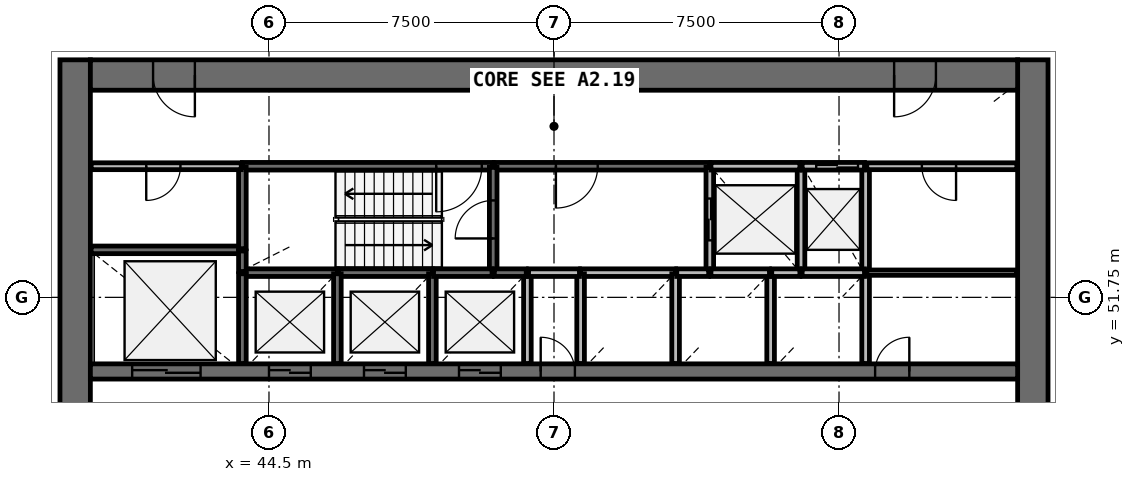
"""IFC4 building model, lengths in metres.
Left out: names, types, materials, properties, quantities, classifications, styles, units other than length and angle.
Written with IfcOpenShell. Run it as: python <this file> out.ifc"""

import sys

from ifc_helpers import new_model, si_unit, direction, frame, frame_2d, origin, place, context, subcontext, project, spatial, rectangle, extrude, source, transform, mapped, element, fill, save


model = new_model("IFC4")
c1 = context("Model", 3, precision=1e-05, world=origin(), true_north=direction((0.0, 1.0)))
c2 = subcontext(c1, "Body", "Model", "MODEL_VIEW")
j1 = project(units=[si_unit("LENGTHUNIT", "METRE"), si_unit("PLANEANGLEUNIT", "RADIAN")], contexts=[c1])
p1 = place(None, origin())
s1 = spatial("IfcSite", under=j1, at=p1, CompositionType="ELEMENT")
p2 = place(p1, origin())
s2 = spatial("IfcBuilding", under=s1, at=p2, CompositionType="ELEMENT")
p3 = place(p2, frame((0.0, 0.0, 79.8)))
s3 = spatial("IfcBuildingStorey", under=s2, at=p3, CompositionType="ELEMENT", Elevation=79.8)
p4 = place(p3, frame((64.6, 38.0, 0.0), z_axis=(0.0, 0.0, 1.0), x_axis=(0.0, 1.0, 0.0)))
e1 = element("IfcWall", 1, at=p4, inside=s3, PredefinedType="SHEAR", context=c2, shape_type="SweptSolid", body=[
    extrude(rectangle(XDim=20.0, YDim=0.8, at=frame_2d((10.0, 0.0))), origin(), (0.0, 0.0, 1.0), 4.1),
])
p5 = place(p4, frame((9.1, 0.0, 0.0)))
e2 = element("IfcOpeningElement", 2, at=p5, cuts=e1, PredefinedType="OPENING", context=c2, shape_type="SweptSolid", body=[
    extrude(rectangle(XDim=1.8, YDim=2.1, at=frame_2d((0.9, 1.05))), frame((0.0, 0.41, 0.0), z_axis=(0.0, -1.0, 0.0), x_axis=(1.0, 0.0, 0.0)), (0.0, 0.0, 1.0), 0.82),
])
p6 = place(p3, frame((39.4, 58.0, 0.0), z_axis=(0.0, 0.0, 1.0), x_axis=(0.0, -1.0, 0.0)))
e3 = element("IfcWall", 3, at=p6, inside=s3, PredefinedType="SHEAR", context=c2, shape_type="SweptSolid", body=[
    extrude(rectangle(XDim=20.0, YDim=0.8, at=frame_2d((10.0, 0.0))), origin(), (0.0, 0.0, 1.0), 4.1),
])
p7 = place(p6, frame((9.1, 0.0, 0.0)))
e4 = element("IfcOpeningElement", 4, at=p7, cuts=e3, PredefinedType="OPENING", context=c2, shape_type="SweptSolid", body=[
    extrude(rectangle(XDim=1.8, YDim=2.1, at=frame_2d((0.9, 1.05))), frame((0.0, 0.41, 0.0), z_axis=(0.0, -1.0, 0.0), x_axis=(1.0, 0.0, 0.0)), (0.0, 0.0, 1.0), 0.82),
])
p8 = place(p3, frame((64.2, 57.6, 0.0), z_axis=(0.0, 0.0, 1.0), x_axis=(-1.0, 0.0, 0.0)))
e5 = element("IfcWall", 5, at=p8, inside=s3, PredefinedType="SHEAR", context=c2, shape_type="SweptSolid", body=[
    extrude(rectangle(XDim=24.4, YDim=0.8, at=frame_2d((12.2, 0.0))), origin(), (0.0, 0.0, 1.0), 4.1),
])
p9 = place(p8, frame((21.65, 0.0, 0.0)))
e6 = element("IfcOpeningElement", 6, at=p9, cuts=e5, PredefinedType="OPENING", context=c2, shape_type="SweptSolid", body=[
    extrude(rectangle(XDim=1.1, YDim=2.1, at=frame_2d((0.55, 1.05))), frame((0.0, 0.41, 0.0), z_axis=(0.0, -1.0, 0.0), x_axis=(1.0, 0.0, 0.0)), (0.0, 0.0, 1.0), 0.82),
])
p10 = place(p8, frame((2.15, 0.0, 0.0)))
e7 = element("IfcOpeningElement", 7, at=p10, cuts=e5, PredefinedType="OPENING", context=c2, shape_type="SweptSolid", body=[
    extrude(rectangle(XDim=1.1, YDim=2.1, at=frame_2d((0.55, 1.05))), frame((0.0, 0.41, 0.0), z_axis=(0.0, -1.0, 0.0), x_axis=(1.0, 0.0, 0.0)), (0.0, 0.0, 1.0), 0.82),
])
p11 = place(p3, frame((39.8, 49.8, 0.0), z_axis=(0.0, 0.0, 1.0), x_axis=(1.0, 0.0, 0.0)))
e8 = element("IfcWall", 8, at=p11, inside=s3, PredefinedType="SHEAR", context=c2, shape_type="SweptSolid", body=[
    extrude(rectangle(XDim=24.4, YDim=0.4, at=frame_2d((12.2, 0.0))), origin(), (0.0, 0.0, 1.0), 4.1),
])
p12 = place(p11, frame((4.7, 0.0, 0.0)))
e9 = element("IfcOpeningElement", 9, at=p12, cuts=e8, PredefinedType="OPENING", context=c2, shape_type="SweptSolid", body=[
    extrude(rectangle(XDim=1.1, YDim=2.1, at=frame_2d((0.55, 1.05))), frame((0.0, 0.21, 0.0), z_axis=(0.0, -1.0, 0.0), x_axis=(1.0, 0.0, 0.0)), (0.0, 0.0, 1.0), 0.42),
])
p13 = place(p11, frame((7.2, 0.0, 0.0)))
e10 = element("IfcOpeningElement", 10, at=p13, cuts=e8, PredefinedType="OPENING", context=c2, shape_type="SweptSolid", body=[
    extrude(rectangle(XDim=1.1, YDim=2.1, at=frame_2d((0.55, 1.05))), frame((0.0, 0.21, 0.0), z_axis=(0.0, -1.0, 0.0), x_axis=(1.0, 0.0, 0.0)), (0.0, 0.0, 1.0), 0.42),
])
p14 = place(p11, frame((9.7, 0.0, 0.0)))
e11 = element("IfcOpeningElement", 11, at=p14, cuts=e8, PredefinedType="OPENING", context=c2, shape_type="SweptSolid", body=[
    extrude(rectangle(XDim=1.1, YDim=2.1, at=frame_2d((0.55, 1.05))), frame((0.0, 0.21, 0.0), z_axis=(0.0, -1.0, 0.0), x_axis=(1.0, 0.0, 0.0)), (0.0, 0.0, 1.0), 0.42),
])
p15 = place(p11, frame((1.1, 0.0, 0.0)))
e12 = element("IfcOpeningElement", 12, at=p15, cuts=e8, PredefinedType="OPENING", context=c2, shape_type="SweptSolid", body=[
    extrude(rectangle(XDim=1.8, YDim=2.4, at=frame_2d((0.9, 1.2))), frame((0.0, 0.21, 0.0), z_axis=(0.0, -1.0, 0.0), x_axis=(1.0, 0.0, 0.0)), (0.0, 0.0, 1.0), 0.42),
])
p16 = place(p11, frame((20.65, 0.0, 0.0)))
e13 = element("IfcOpeningElement", 13, at=p16, cuts=e8, PredefinedType="OPENING", context=c2, shape_type="SweptSolid", body=[
    extrude(rectangle(XDim=0.9, YDim=2.1, at=frame_2d((0.45, 1.05))), frame((0.0, 0.21, 0.0), z_axis=(0.0, -1.0, 0.0), x_axis=(1.0, 0.0, 0.0)), (0.0, 0.0, 1.0), 0.42),
])
p17 = place(p11, frame((11.85, 0.0, 0.0)))
e14 = element("IfcOpeningElement", 14, at=p17, cuts=e8, PredefinedType="OPENING", context=c2, shape_type="SweptSolid", body=[
    extrude(rectangle(XDim=0.9, YDim=2.1, at=frame_2d((0.45, 1.05))), frame((0.0, 0.21, 0.0), z_axis=(0.0, -1.0, 0.0), x_axis=(1.0, 0.0, 0.0)), (0.0, 0.0, 1.0), 0.42),
])
p18 = place(p3, frame((50.4, 55.2, 0.0), z_axis=(0.0, 0.0, 1.0), x_axis=(-1.0, 0.0, 0.0)))
e15 = element("IfcWall", 15, at=p18, inside=s3, PredefinedType="SOLIDWALL", context=c2, shape_type="SweptSolid", body=[
    extrude(rectangle(XDim=6.6, YDim=0.2, at=frame_2d((3.3, 0.0))), origin(), (0.0, 0.0, 1.0), 3.7),
])
p19 = place(p18, frame((0.3, 0.0, 0.0)))
e16 = element("IfcOpeningElement", 16, at=p19, cuts=e15, PredefinedType="OPENING", context=c2, shape_type="SweptSolid", body=[
    extrude(rectangle(XDim=1.2, YDim=2.1, at=frame_2d((0.6, 1.05))), frame((0.0, 0.11, 0.0), z_axis=(0.0, -1.0, 0.0), x_axis=(1.0, 0.0, 0.0)), (0.0, 0.0, 1.0), 0.22),
])
p20 = place(p3, frame((56.1, 55.2, 0.0), z_axis=(0.0, 0.0, 1.0), x_axis=(-1.0, 0.0, 0.0)))
e17 = element("IfcWall", 17, at=p20, inside=s3, PredefinedType="SOLIDWALL", context=c2, shape_type="SweptSolid", body=[
    extrude(rectangle(XDim=5.67, YDim=0.2, at=frame_2d((2.835, 0.0))), origin(), (0.0, 0.0, 1.0), 3.7),
])
p21 = place(p20, frame((2.95, 0.0, 0.0)))
e18 = element("IfcOpeningElement", 18, at=p21, cuts=e17, PredefinedType="OPENING", context=c2, shape_type="SweptSolid", body=[
    extrude(rectangle(XDim=1.1, YDim=2.1, at=frame_2d((0.55, 1.05))), frame((0.0, 0.11, 0.0), z_axis=(0.0, -1.0, 0.0), x_axis=(1.0, 0.0, 0.0)), (0.0, 0.0, 1.0), 0.22),
])
p22 = place(p3, frame((43.8, 53.0, 0.0), z_axis=(0.0, 0.0, 1.0), x_axis=(-1.0, 0.0, 0.0)))
e19 = element("IfcWall", 19, at=p22, inside=s3, PredefinedType="SOLIDWALL", context=c2, shape_type="SweptSolid", body=[
    extrude(rectangle(XDim=3.98, YDim=0.2, at=frame_2d((1.99, 0.0))), origin(), (0.0, 0.0, 1.0), 3.7),
])
p23 = place(p3, frame((50.4, 52.4, 0.0), z_axis=(0.0, 0.0, 1.0), x_axis=(0.0, 1.0, 0.0)))
e20 = element("IfcWall", 20, at=p23, inside=s3, PredefinedType="SOLIDWALL", context=c2, shape_type="SweptSolid", body=[
    extrude(rectangle(XDim=2.77, YDim=0.2, at=frame_2d((1.385, 0.0))), origin(), (0.0, 0.0, 1.0), 3.7),
])
p24 = place(p23, frame((0.9, 0.0, 0.0)))
e21 = element("IfcOpeningElement", 21, at=p24, cuts=e20, PredefinedType="OPENING", context=c2, shape_type="SweptSolid", body=[
    extrude(rectangle(XDim=1.0, YDim=2.1, at=frame_2d((0.5, 1.05))), frame((0.0, 0.11, 0.0), z_axis=(0.0, -1.0, 0.0), x_axis=(1.0, 0.0, 0.0)), (0.0, 0.0, 1.0), 0.22),
])
p25 = place(p3, frame((56.1, 55.17, 0.0), z_axis=(0.0, 0.0, 1.0), x_axis=(0.0, -1.0, 0.0)))
e22 = element("IfcWall", 22, at=p25, inside=s3, PredefinedType="SOLIDWALL", context=c2, shape_type="SweptSolid", body=[
    extrude(rectangle(XDim=2.77, YDim=0.2, at=frame_2d((1.385, 0.0))), origin(), (0.0, 0.0, 1.0), 3.7),
])
p26 = place(p25, frame((0.82, 0.0, 0.0)))
e23 = element("IfcOpeningElement", 23, at=p26, cuts=e22, PredefinedType="OPENING", context=c2, shape_type="SweptSolid", body=[
    extrude(rectangle(XDim=1.1, YDim=2.1, at=frame_2d((0.55, 1.05))), frame((0.0, 0.11, 0.0), z_axis=(0.0, -1.0, 0.0), x_axis=(1.0, 0.0, 0.0)), (0.0, 0.0, 1.0), 0.22),
])
for number, where, z_axis, x_axis in (
    (24, (58.5, 52.4, 0.0), (0.0, 0.0, 1.0), (0.0, 1.0, 0.0)),
    (25, (60.2, 52.4, 0.0), (0.0, 0.0, 1.0), (0.0, 1.0, 0.0)),
):
    element("IfcWall", number, at=place(p3, frame(where, z_axis=z_axis, x_axis=x_axis)), inside=s3, PredefinedType="SOLIDWALL", context=c2, shape_type="SweptSolid", body=[
        extrude(rectangle(XDim=2.8, YDim=0.2, at=frame_2d((1.4, 0.0))), origin(), (0.0, 0.0, 1.0), 3.7),
    ])
p27 = place(p3, frame((46.3, 52.4, 0.0), z_axis=(0.0, 0.0, 1.0), x_axis=(-1.0, 0.0, 0.0)))
e26 = element("IfcWall", 26, at=p27, inside=s3, PredefinedType="SOLIDWALL", context=c2, shape_type="SweptSolid", body=[
    extrude(rectangle(XDim=2.5, YDim=0.2, at=frame_2d((1.25, 0.0))), origin(), (0.0, 0.0, 1.0), 3.7),
])
p28 = place(p3, frame((48.8, 52.4, 0.0), z_axis=(0.0, 0.0, 1.0), x_axis=(-1.0, 0.0, 0.0)))
e27 = element("IfcWall", 27, at=p28, inside=s3, PredefinedType="SOLIDWALL", context=c2, shape_type="SweptSolid", body=[
    extrude(rectangle(XDim=2.47, YDim=0.2, at=frame_2d((1.235, 0.0))), origin(), (0.0, 0.0, 1.0), 3.7),
])
p29 = place(p3, frame((55.2, 52.4, 0.0), z_axis=(0.0, 0.0, 1.0), x_axis=(-1.0, 0.0, 0.0)))
e28 = element("IfcWall", 28, at=p29, inside=s3, PredefinedType="SOLIDWALL", context=c2, shape_type="SweptSolid", body=[
    extrude(rectangle(XDim=2.5, YDim=0.2, at=frame_2d((1.25, 0.0))), origin(), (0.0, 0.0, 1.0), 3.7),
])
p30 = place(p3, frame((58.47, 55.2, 0.0), z_axis=(0.0, 0.0, 1.0), x_axis=(-1.0, 0.0, 0.0)))
e29 = element("IfcWall", 29, at=p30, inside=s3, PredefinedType="SOLIDWALL", context=c2, shape_type="SweptSolid", body=[
    extrude(rectangle(XDim=2.34, YDim=0.2, at=frame_2d((1.17, 0.0))), origin(), (0.0, 0.0, 1.0), 3.7),
])
for number, where, z_axis, x_axis in (
    (30, (43.8, 52.37, 0.0), (0.0, 0.0, 1.0), (0.0, -1.0, 0.0)),
    (31, (46.3, 50.01, 0.0), (0.0, 0.0, 1.0), (0.0, 1.0, 0.0)),
    (32, (48.8, 50.01, 0.0), (0.0, 0.0, 1.0), (0.0, 1.0, 0.0)),
):
    element("IfcWall", number, at=place(p3, frame(where, z_axis=z_axis, x_axis=x_axis)), inside=s3, PredefinedType="SOLIDWALL", context=c2, shape_type="SweptSolid", body=[
        extrude(rectangle(XDim=2.36, YDim=0.2, at=frame_2d((1.18, 0.0))), origin(), (0.0, 0.0, 1.0), 3.7),
    ])
p31 = place(p3, frame((51.3, 50.01, 0.0), z_axis=(0.0, 0.0, 1.0), x_axis=(0.0, 1.0, 0.0)))
e33 = element("IfcWall", 33, at=p31, inside=s3, PredefinedType="SOLIDWALL", context=c2, shape_type="SweptSolid", body=[
    extrude(rectangle(XDim=2.39, YDim=0.2, at=frame_2d((1.195, 0.0))), origin(), (0.0, 0.0, 1.0), 3.7),
])
for number, where, z_axis, x_axis in (
    (34, (52.7, 52.37, 0.0), (0.0, 0.0, 1.0), (0.0, -1.0, 0.0)),
    (35, (55.2, 50.01, 0.0), (0.0, 0.0, 1.0), (0.0, 1.0, 0.0)),
):
    element("IfcWall", number, at=place(p3, frame(where, z_axis=z_axis, x_axis=x_axis)), inside=s3, PredefinedType="SOLIDWALL", context=c2, shape_type="SweptSolid", body=[
        extrude(rectangle(XDim=2.36, YDim=0.2, at=frame_2d((1.18, 0.0))), origin(), (0.0, 0.0, 1.0), 3.7),
    ])
p32 = place(p3, frame((57.7, 50.01, 0.0), z_axis=(0.0, 0.0, 1.0), x_axis=(0.0, 1.0, 0.0)))
e36 = element("IfcWall", 36, at=p32, inside=s3, PredefinedType="SOLIDWALL", context=c2, shape_type="SweptSolid", body=[
    extrude(rectangle(XDim=2.39, YDim=0.2, at=frame_2d((1.195, 0.0))), origin(), (0.0, 0.0, 1.0), 3.7),
])
p33 = place(p3, frame((60.2, 50.01, 0.0), z_axis=(0.0, 0.0, 1.0), x_axis=(0.0, 1.0, 0.0)))
e37 = element("IfcWall", 37, at=p33, inside=s3, PredefinedType="SOLIDWALL", context=c2, shape_type="SweptSolid", body=[
    extrude(rectangle(XDim=2.36, YDim=0.2, at=frame_2d((1.18, 0.0))), origin(), (0.0, 0.0, 1.0), 3.7),
])
p34 = place(p3, frame((43.8, 55.17, 0.0), z_axis=(0.0, 0.0, 1.0), x_axis=(0.0, -1.0, 0.0)))
e38 = element("IfcWall", 38, at=p34, inside=s3, PredefinedType="SOLIDWALL", context=c2, shape_type="SweptSolid", body=[
    extrude(rectangle(XDim=2.14, YDim=0.2, at=frame_2d((1.07, 0.0))), origin(), (0.0, 0.0, 1.0), 3.7),
])
p35 = place(p3, frame((60.17, 52.4, 0.0), z_axis=(0.0, 0.0, 1.0), x_axis=(-1.0, 0.0, 0.0)))
e39 = element("IfcWall", 39, at=p35, inside=s3, PredefinedType="SOLIDWALL", context=c2, shape_type="SweptSolid", body=[
    extrude(rectangle(XDim=1.64, YDim=0.2, at=frame_2d((0.82, 0.0))), origin(), (0.0, 0.0, 1.0), 3.7),
])
p36 = place(p3, frame((60.17, 55.2, 0.0), z_axis=(0.0, 0.0, 1.0), x_axis=(-1.0, 0.0, 0.0)))
e40 = element("IfcWall", 40, at=p36, inside=s3, PredefinedType="SOLIDWALL", context=c2, shape_type="SweptSolid", body=[
    extrude(rectangle(XDim=1.64, YDim=0.2, at=frame_2d((0.82, 0.0))), origin(), (0.0, 0.0, 1.0), 3.7),
])
p37 = place(p36, frame((0.17, 0.0, 0.0)))
e41 = element("IfcOpeningElement", 41, at=p37, cuts=e40, PredefinedType="OPENING", context=c2, shape_type="SweptSolid", body=[
    extrude(rectangle(XDim=1.1, YDim=2.1, at=frame_2d((0.55, 1.05))), frame((0.0, 0.11, 0.0), z_axis=(0.0, -1.0, 0.0), x_axis=(1.0, 0.0, 0.0)), (0.0, 0.0, 1.0), 0.22),
])
for number, where, z_axis, x_axis in (
    (42, (50.37, 52.4, 0.0), (0.0, 0.0, 1.0), (-1.0, 0.0, 0.0)),
    (43, (57.67, 52.4, 0.0), (0.0, 0.0, 1.0), (-1.0, 0.0, 0.0)),
):
    element("IfcWall", number, at=place(p3, frame(where, z_axis=z_axis, x_axis=x_axis)), inside=s3, PredefinedType="SOLIDWALL", context=c2, shape_type="SweptSolid", body=[
        extrude(rectangle(XDim=1.54, YDim=0.2, at=frame_2d((0.77, 0.0))), origin(), (0.0, 0.0, 1.0), 3.7),
    ])
p38 = place(p3, frame((51.33, 52.4, 0.0), z_axis=(0.0, 0.0, 1.0), x_axis=(1.0, 0.0, 0.0)))
e44 = element("IfcWall", 44, at=p38, inside=s3, PredefinedType="SOLIDWALL", context=c2, shape_type="SweptSolid", body=[
    extrude(rectangle(XDim=1.34, YDim=0.2, at=frame_2d((0.67, 0.0))), origin(), (0.0, 0.0, 1.0), 3.7),
])
for number, where, z_axis, x_axis in (
    (45, (51.27, 52.4, 0.0), (0.0, 0.0, 1.0), (-1.0, 0.0, 0.0)),
    (46, (56.07, 52.4, 0.0), (0.0, 0.0, 1.0), (-1.0, 0.0, 0.0)),
):
    element("IfcWall", number, at=place(p3, frame(where, z_axis=z_axis, x_axis=x_axis)), inside=s3, PredefinedType="SOLIDWALL", context=c2, shape_type="SweptSolid", body=[
        extrude(rectangle(XDim=0.84, YDim=0.2, at=frame_2d((0.42, 0.0))), origin(), (0.0, 0.0, 1.0), 3.7),
    ])
p39 = place(p3, frame((58.47, 52.4, 0.0), z_axis=(0.0, 0.0, 1.0), x_axis=(-1.0, 0.0, 0.0)))
e47 = element("IfcWall", 47, at=p39, inside=s3, PredefinedType="SOLIDWALL", context=c2, shape_type="SweptSolid", body=[
    extrude(rectangle(XDim=0.74, YDim=0.2, at=frame_2d((0.37, 0.0))), origin(), (0.0, 0.0, 1.0), 3.7),
])
p40 = place(p3, frame((43.8, 52.43, 0.0), z_axis=(0.0, 0.0, 1.0), x_axis=(0.0, 1.0, 0.0)))
e48 = element("IfcWall", 48, at=p40, inside=s3, PredefinedType="SOLIDWALL", context=c2, shape_type="SweptSolid", body=[
    extrude(rectangle(XDim=0.54, YDim=0.2, at=frame_2d((0.27, 0.0))), origin(), (0.0, 0.0, 1.0), 3.7),
])
p41 = place(p3, frame((64.18, 55.2, 0.0), z_axis=(0.0, 0.0, 1.0), x_axis=(-1.0, 0.0, 0.0)))
e49 = element("IfcWall", 49, at=p41, inside=s3, PredefinedType="PARTITIONING", context=c2, shape_type="SweptSolid", body=[
    extrude(rectangle(XDim=3.95, YDim=0.18, at=frame_2d((1.975, 0.0))), origin(), (0.0, 0.0, 1.0), 3.7),
])
p42 = place(p41, frame((1.6, 0.0, 0.0)))
e50 = element("IfcOpeningElement", 50, at=p42, cuts=e49, PredefinedType="OPENING", context=c2, shape_type="SweptSolid", body=[
    extrude(rectangle(XDim=0.9, YDim=2.1, at=frame_2d((0.45, 1.05))), frame((0.0, 0.1, 0.0), z_axis=(0.0, -1.0, 0.0), x_axis=(1.0, 0.0, 0.0)), (0.0, 0.0, 1.0), 0.2),
])
p43 = place(p3, frame((43.77, 55.2, 0.0), z_axis=(0.0, 0.0, 1.0), x_axis=(-1.0, 0.0, 0.0)))
e51 = element("IfcWall", 51, at=p43, inside=s3, PredefinedType="PARTITIONING", context=c2, shape_type="SweptSolid", body=[
    extrude(rectangle(XDim=3.95, YDim=0.18, at=frame_2d((1.975, 0.0))), origin(), (0.0, 0.0, 1.0), 3.7),
])
p44 = place(p43, frame((1.6, 0.0, 0.0)))
e52 = element("IfcOpeningElement", 52, at=p44, cuts=e51, PredefinedType="OPENING", context=c2, shape_type="SweptSolid", body=[
    extrude(rectangle(XDim=0.9, YDim=2.1, at=frame_2d((0.45, 1.05))), frame((0.0, 0.1, 0.0), z_axis=(0.0, -1.0, 0.0), x_axis=(1.0, 0.0, 0.0)), (0.0, 0.0, 1.0), 0.2),
])
p45 = place(p3, frame((64.18, 52.4, 0.0), z_axis=(0.0, 0.0, 1.0), x_axis=(-1.0, 0.0, 0.0)))
e53 = element("IfcWall", 53, at=p45, inside=s3, PredefinedType="PARTITIONING", context=c2, shape_type="SweptSolid", body=[
    extrude(rectangle(XDim=3.95, YDim=0.14, at=frame_2d((1.975, 0.0))), origin(), (0.0, 0.0, 1.0), 2.9),
])
m1 = source(origin(), c2, "Body", "SweptSolid", [
    extrude(rectangle(XDim=1.1, YDim=2.1, at=frame_2d((0.55, 1.05))), frame((0.0, 0.025, 0.0), z_axis=(0.0, -1.0, 0.0), x_axis=(1.0, 0.0, 0.0)), (0.0, 0.0, 1.0), 0.05),
])
p46 = place(p12, origin())
e54 = element("IfcDoor", 54, at=p46, inside=s3, OperationType="DOUBLE_DOOR_SLIDING", PredefinedType="USERDEFINED", context=c2, shape_type="MappedRepresentation", body=[
    mapped(m1, transform((0.0, 0.0, 0.0), scale=1.0)),
])
fill(e9, e54)
p47 = place(p13, origin())
e55 = element("IfcDoor", 55, at=p47, inside=s3, OperationType="DOUBLE_DOOR_SLIDING", PredefinedType="USERDEFINED", context=c2, shape_type="MappedRepresentation", body=[
    mapped(m1, transform((0.0, 0.0, 0.0), scale=1.0)),
])
fill(e10, e55)
p48 = place(p14, origin())
e56 = element("IfcDoor", 56, at=p48, inside=s3, OperationType="DOUBLE_DOOR_SLIDING", PredefinedType="USERDEFINED", context=c2, shape_type="MappedRepresentation", body=[
    mapped(m1, transform((0.0, 0.0, 0.0), scale=1.0)),
])
fill(e11, e56)
p49 = place(p26, origin())
e57 = element("IfcDoor", 57, at=p49, inside=s3, OperationType="DOUBLE_DOOR_SLIDING", PredefinedType="USERDEFINED", context=c2, shape_type="MappedRepresentation", body=[
    mapped(m1, transform((0.0, 0.0, 0.0), scale=1.0)),
])
fill(e23, e57)
p50 = place(p37, origin())
e58 = element("IfcDoor", 58, at=p50, inside=s3, OperationType="DOUBLE_DOOR_SLIDING", PredefinedType="USERDEFINED", context=c2, shape_type="MappedRepresentation", body=[
    mapped(m1, transform((0.0, 0.0, 0.0), scale=1.0)),
])
fill(e41, e58)
m2 = source(origin(), c2, "Body", "SweptSolid", [
    extrude(rectangle(XDim=1.8, YDim=2.4, at=frame_2d((0.9, 1.2))), frame((0.0, 0.025, 0.0), z_axis=(0.0, -1.0, 0.0), x_axis=(1.0, 0.0, 0.0)), (0.0, 0.0, 1.0), 0.05),
])
p51 = place(p15, origin())
e59 = element("IfcDoor", 59, at=p51, inside=s3, OperationType="DOUBLE_DOOR_SLIDING", PredefinedType="USERDEFINED", context=c2, shape_type="MappedRepresentation", body=[
    mapped(m2, transform((0.0, 0.0, 0.0), scale=1.0)),
])
fill(e12, e59)
m3 = source(origin(), c2, "Body", "SweptSolid", [
    extrude(rectangle(XDim=1.2, YDim=2.1, at=frame_2d((0.6, 1.05))), frame((0.0, 0.025, 0.0), z_axis=(0.0, -1.0, 0.0), x_axis=(1.0, 0.0, 0.0)), (0.0, 0.0, 1.0), 0.05),
])
p52 = place(p19, origin())
e60 = element("IfcDoor", 60, at=p52, inside=s3, OperationType="SINGLE_SWING_RIGHT", PredefinedType="DOOR", context=c2, shape_type="MappedRepresentation", body=[
    mapped(m3, transform((0.0, 0.0, 0.0), scale=1.0)),
])
fill(e16, e60)
m4 = source(origin(), c2, "Body", "SweptSolid", [
    extrude(rectangle(XDim=1.0, YDim=2.1, at=frame_2d((0.5, 1.05))), frame((0.0, 0.025, 0.0), z_axis=(0.0, -1.0, 0.0), x_axis=(1.0, 0.0, 0.0)), (0.0, 0.0, 1.0), 0.05),
])
p53 = place(p24, origin())
e61 = element("IfcDoor", 61, at=p53, inside=s3, OperationType="SINGLE_SWING_LEFT", PredefinedType="DOOR", context=c2, shape_type="MappedRepresentation", body=[
    mapped(m4, transform((0.0, 0.0, 0.0), scale=1.0)),
])
fill(e21, e61)
m5 = source(origin(), c2, "Body", "SweptSolid", [
    extrude(rectangle(XDim=1.1, YDim=2.1, at=frame_2d((0.55, 1.05))), frame((0.0, 0.025, 0.0), z_axis=(0.0, -1.0, 0.0), x_axis=(1.0, 0.0, 0.0)), (0.0, 0.0, 1.0), 0.05),
])
p54 = place(p21, origin())
e62 = element("IfcDoor", 62, at=p54, inside=s3, OperationType="SINGLE_SWING_RIGHT", PredefinedType="DOOR", context=c2, shape_type="MappedRepresentation", body=[
    mapped(m5, transform((0.0, 0.0, 0.0), scale=1.0)),
])
fill(e18, e62)
m6 = source(origin(), c2, "Body", "SweptSolid", [
    extrude(rectangle(XDim=1.1, YDim=2.1, at=frame_2d((0.55, 1.05))), frame((0.0, 0.025, 0.0), z_axis=(0.0, -1.0, 0.0), x_axis=(1.0, 0.0, 0.0)), (0.0, 0.0, 1.0), 0.05),
])
p55 = place(p9, origin())
e63 = element("IfcDoor", 63, at=p55, inside=s3, OperationType="SINGLE_SWING_LEFT", PredefinedType="DOOR", context=c2, shape_type="MappedRepresentation", body=[
    mapped(m6, transform((0.0, 0.0, 0.0), scale=1.0)),
])
fill(e6, e63)
p56 = place(p10, origin())
e64 = element("IfcDoor", 64, at=p56, inside=s3, OperationType="SINGLE_SWING_RIGHT", PredefinedType="DOOR", context=c2, shape_type="MappedRepresentation", body=[
    mapped(m6, transform((0.0, 0.0, 0.0), scale=1.0)),
])
fill(e7, e64)
m7 = source(origin(), c2, "Body", "SweptSolid", [
    extrude(rectangle(XDim=0.9, YDim=2.1, at=frame_2d((0.45, 1.05))), frame((0.0, 0.025, 0.0), z_axis=(0.0, -1.0, 0.0), x_axis=(1.0, 0.0, 0.0)), (0.0, 0.0, 1.0), 0.05),
])
p57 = place(p44, origin())
e65 = element("IfcDoor", 65, at=p57, inside=s3, OperationType="SINGLE_SWING_RIGHT", PredefinedType="DOOR", context=c2, shape_type="MappedRepresentation", body=[
    mapped(m7, transform((0.0, 0.0, 0.0), scale=1.0)),
])
fill(e52, e65)
p58 = place(p16, origin())
e66 = element("IfcDoor", 66, at=p58, inside=s3, OperationType="SINGLE_SWING_RIGHT", PredefinedType="DOOR", context=c2, shape_type="MappedRepresentation", body=[
    mapped(m7, transform((0.0, 0.0, 0.0), scale=1.0)),
])
fill(e13, e66)
p59 = place(p42, origin())
e67 = element("IfcDoor", 67, at=p59, inside=s3, OperationType="SINGLE_SWING_LEFT", PredefinedType="DOOR", context=c2, shape_type="MappedRepresentation", body=[
    mapped(m7, transform((0.0, 0.0, 0.0), scale=1.0)),
])
fill(e50, e67)
p60 = place(p17, origin())
e68 = element("IfcDoor", 68, at=p60, inside=s3, OperationType="SINGLE_SWING_LEFT", PredefinedType="DOOR", context=c2, shape_type="MappedRepresentation", body=[
    mapped(m7, transform((0.0, 0.0, 0.0), scale=1.0)),
])
fill(e14, e68)
save(model, sys.argv[1])
